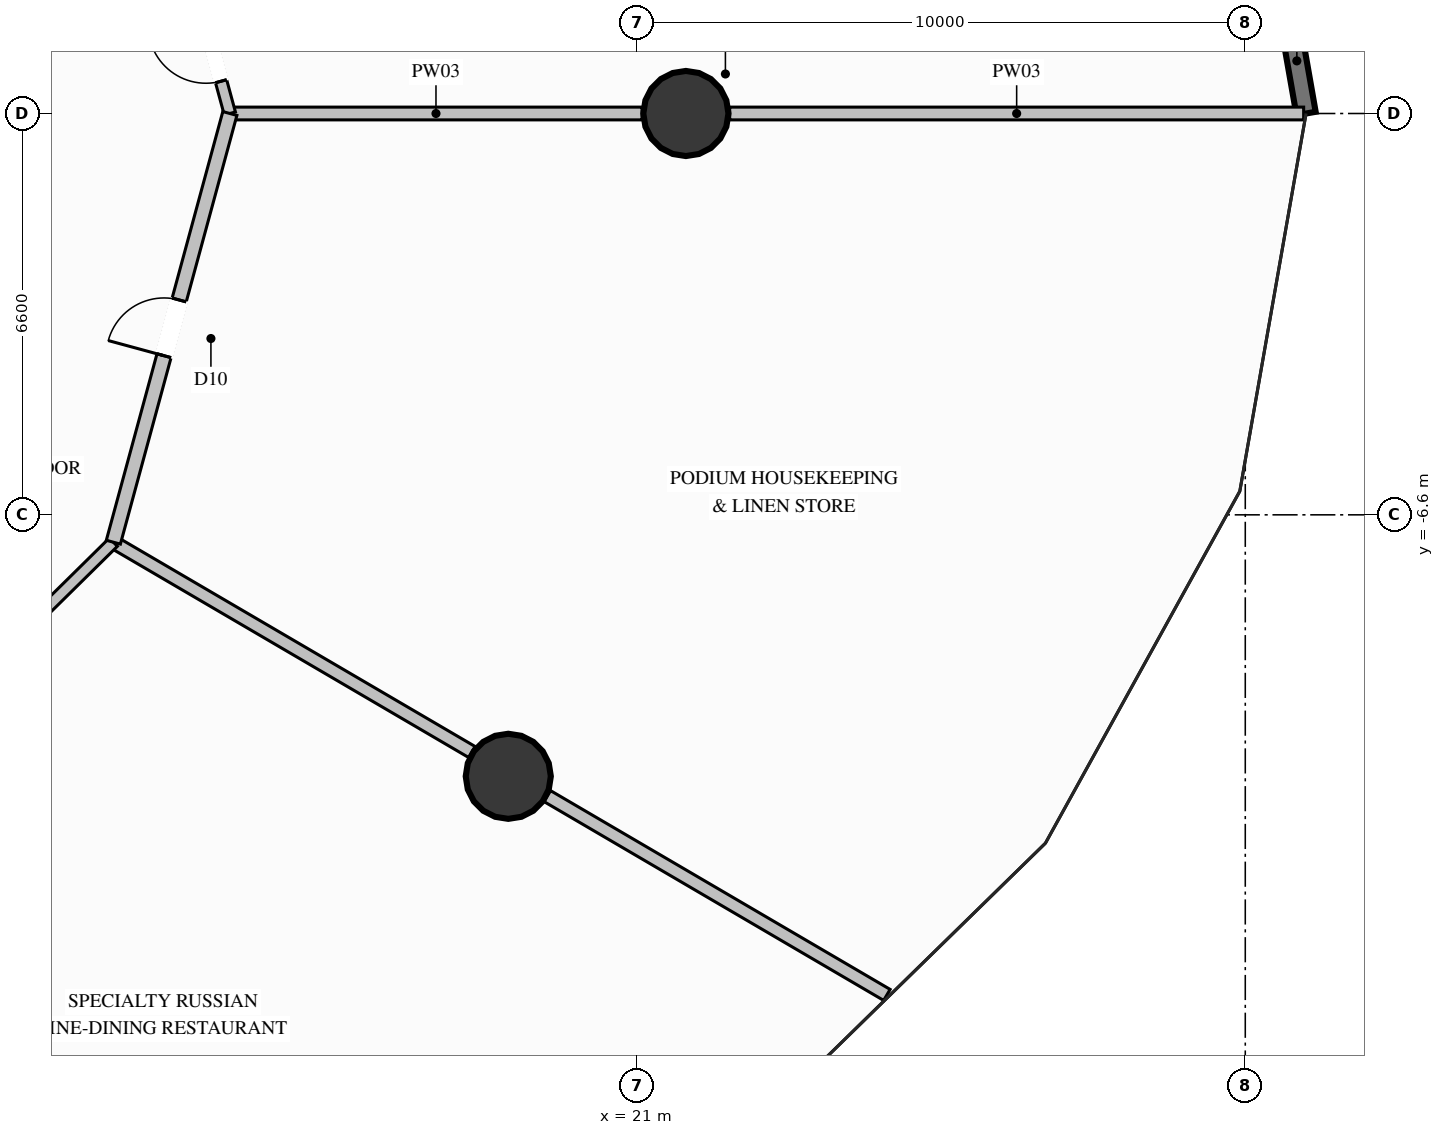
"""IFC4 building model, lengths in metres.
Left out: names, types, materials, properties, quantities, classifications, styles, units other than length and angle.
Written with IfcOpenShell. Run it as: python <this file> out.ifc"""

import sys

from ifc_helpers import new_model, si_unit, direction, frame, frame_2d, origin, origin_2d, place, context, subcontext, project, spatial, rectangle, circle, extrude, element, fill, save


model = new_model("IFC4")
c1 = context("Model", 3, precision=1e-05, world=origin(), true_north=direction((0.0, 1.0)))
c2 = subcontext(c1, "Body", "Model", "MODEL_VIEW")
j1 = project(units=[si_unit("LENGTHUNIT", "METRE"), si_unit("PLANEANGLEUNIT", "RADIAN")], contexts=[c1])
p1 = place(None, origin())
s1 = spatial("IfcSite", under=j1, at=p1, CompositionType="ELEMENT")
p2 = place(p1, origin())
s2 = spatial("IfcBuilding", under=s1, at=p2, CompositionType="ELEMENT")
p3 = place(p2, frame((0.0, 0.0, 7.2)))
s3 = spatial("IfcBuildingStorey", under=s2, at=p3, CompositionType="ELEMENT", Elevation=7.2)
for number, where, z_axis, x_axis in (
    (1, (21.8, 0.0, 0.0), (0.0, 0.0, 1.0), (1.0, 0.0, 0.0)),
    (2, (18.879, -10.9, 0.0), (0.0, 0.0, 1.0), (1.0, 0.0, 0.0)),
):
    element("IfcColumn", number, at=place(p3, frame(where, z_axis=z_axis, x_axis=x_axis)), inside=s3, PredefinedType="COLUMN", context=c2, shape_type="SweptSolid", body=[
        extrude(circle(Radius=0.7, at=origin_2d()), origin(), (0.0, 0.0, 1.0), 5.4),
    ])
p4 = place(p3, frame((30.91, 6.212, 0.0), z_axis=(0.0, 0.0, 1.0), x_axis=(0.172842303266, -0.984949510483, 0.0)))
e3 = element("IfcWall", 3, at=p4, inside=s3, PredefinedType="SOLIDWALL", context=c2, shape_type="SweptSolid", body=[
    extrude(rectangle(XDim=6.307, YDim=0.32, at=frame_2d((3.153, 0.0))), origin(), (0.0, 0.0, 1.0), 4.98),
])
p5 = place(p4, frame((1.9, 0.0, 0.65)))
e4 = element("IfcOpeningElement", 4, at=p5, cuts=e3, PredefinedType="OPENING", context=c2, shape_type="SweptSolid", body=[
    extrude(rectangle(XDim=2.4, YDim=3.2, at=frame_2d((1.2, 1.6))), frame((0.0, 0.17, 0.0), z_axis=(0.0, -1.0, 0.0), x_axis=(1.0, 0.0, 0.0)), (0.0, 0.0, 1.0), 0.34),
])
p6 = place(p3, frame((14.3, 0.0, 0.0), z_axis=(0.0, 0.0, 1.0), x_axis=(1.0, 0.0, 0.0)))
e5 = element("IfcWall", 5, at=p6, inside=s3, PredefinedType="PARTITIONING", context=c2, shape_type="SweptSolid", body=[
    extrude(rectangle(XDim=6.78, YDim=0.21, at=frame_2d((3.39, 0.0))), origin(), (0.0, 0.0, 1.0), 4.191),
])
p7 = place(p3, frame((22.52, 0.0, 0.0), z_axis=(0.0, 0.0, 1.0), x_axis=(1.0, 0.0, 0.0)))
e6 = element("IfcWall", 6, at=p7, inside=s3, PredefinedType="PARTITIONING", context=c2, shape_type="SweptSolid", body=[
    extrude(rectangle(XDim=9.44, YDim=0.21, at=frame_2d((4.72, 0.0))), origin(), (0.0, 0.0, 1.0), 4.98),
])
p8 = place(p3, frame((12.384, -7.05, 0.0), z_axis=(0.0, 0.0, 1.0), x_axis=(0.863101484719, -0.505030520934, 0.0)))
e7 = element("IfcWall", 7, at=p8, inside=s3, PredefinedType="PARTITIONING", context=c2, shape_type="SweptSolid", body=[
    extrude(rectangle(XDim=6.831, YDim=0.21, at=frame_2d((3.416, 0.0))), origin(), (0.0, 0.0, 1.0), 4.191),
])
p9 = place(p3, frame((19.521, -11.226, 0.0), z_axis=(0.0, 0.0, 1.0), x_axis=(0.863028108689, -0.505155900304, 0.0)))
e8 = element("IfcWall", 8, at=p9, inside=s3, PredefinedType="PARTITIONING", context=c2, shape_type="SweptSolid", body=[
    extrude(rectangle(XDim=6.471, YDim=0.21, at=frame_2d((3.236, 0.0))), origin(), (0.0, 0.0, 1.0), 4.98),
])
p10 = place(p3, frame((14.3, 0.0, 0.0), z_axis=(0.0, 0.0, 1.0), x_axis=(-0.262260528785, 0.964997106235, 0.0)))
e9 = element("IfcWall", 9, at=p10, inside=s3, PredefinedType="PARTITIONING", context=c2, shape_type="SweptSolid", body=[
    extrude(rectangle(XDim=7.306, YDim=0.19, at=frame_2d((3.653, 0.0))), origin(), (0.0, 0.0, 1.0), 4.558),
])
p11 = place(p10, frame((0.55, 0.0, 0.0)))
e10 = element("IfcOpeningElement", 10, at=p11, cuts=e9, PredefinedType="OPENING", context=c2, shape_type="SweptSolid", body=[
    extrude(rectangle(XDim=0.95, YDim=2.1, at=frame_2d((0.475, 1.05))), frame((0.0, 0.105, 0.0), z_axis=(0.0, -1.0, 0.0), x_axis=(1.0, 0.0, 0.0)), (0.0, 0.0, 1.0), 0.21),
])
p12 = place(p10, frame((4.756, 0.0, 0.9)))
e11 = element("IfcOpeningElement", 11, at=p12, cuts=e9, PredefinedType="OPENING", context=c2, shape_type="SweptSolid", body=[
    extrude(rectangle(XDim=2.0, YDim=1.6, at=frame_2d((1.0, 0.8))), frame((0.0, 0.105, 0.0), z_axis=(0.0, -1.0, 0.0), x_axis=(1.0, 0.0, 0.0)), (0.0, 0.0, 1.0), 0.21),
])
p13 = place(p3, frame((7.15, -12.211, 0.0), z_axis=(0.0, 0.0, 1.0), x_axis=(0.712071304345, 0.702107155303, 0.0)))
e12 = element("IfcWall", 12, at=p13, inside=s3, PredefinedType="PARTITIONING", context=c2, shape_type="SweptSolid", body=[
    extrude(rectangle(XDim=7.351, YDim=0.19, at=frame_2d((3.675, 0.0))), origin(), (0.0, 0.0, 1.0), 4.98),
])
p14 = place(p3, frame((12.384, -7.05, 0.0), z_axis=(0.0, 0.0, 1.0), x_axis=(0.262260528785, 0.964997106235, 0.0)))
e13 = element("IfcWall", 13, at=p14, inside=s3, PredefinedType="PARTITIONING", context=c2, shape_type="SweptSolid", body=[
    extrude(rectangle(XDim=7.306, YDim=0.24, at=frame_2d((3.653, 0.0))), origin(), (0.0, 0.0, 1.0), 4.558),
])
p15 = place(p14, frame((3.178, 0.0, 0.0)))
e14 = element("IfcOpeningElement", 14, at=p15, cuts=e13, PredefinedType="OPENING", context=c2, shape_type="SweptSolid", body=[
    extrude(rectangle(XDim=0.95, YDim=2.1, at=frame_2d((0.475, 1.05))), frame((0.0, 0.13, 0.0), z_axis=(0.0, -1.0, 0.0), x_axis=(1.0, 0.0, 0.0)), (0.0, 0.0, 1.0), 0.26),
])
p16 = place(p11, origin())
e15 = element("IfcDoor", 15, at=p16, inside=s3, OperationType="SINGLE_SWING_RIGHT", PredefinedType="DOOR", context=c2, shape_type="SweptSolid", body=[
    extrude(rectangle(XDim=0.95, YDim=2.1, at=frame_2d((0.475, 1.05))), frame((0.0, 0.025, 0.0), z_axis=(0.0, -1.0, 0.0), x_axis=(1.0, 0.0, 0.0)), (0.0, 0.0, 1.0), 0.05),
])
fill(e10, e15)
p17 = place(p15, origin())
e16 = element("IfcDoor", 16, at=p17, inside=s3, OperationType="SINGLE_SWING_LEFT", PredefinedType="DOOR", context=c2, shape_type="SweptSolid", body=[
    extrude(rectangle(XDim=0.95, YDim=2.1, at=frame_2d((0.475, 1.05))), frame((0.0, 0.025, 0.0), z_axis=(0.0, -1.0, 0.0), x_axis=(1.0, 0.0, 0.0)), (0.0, 0.0, 1.0), 0.05),
])
fill(e14, e16)
save(model, sys.argv[1])
